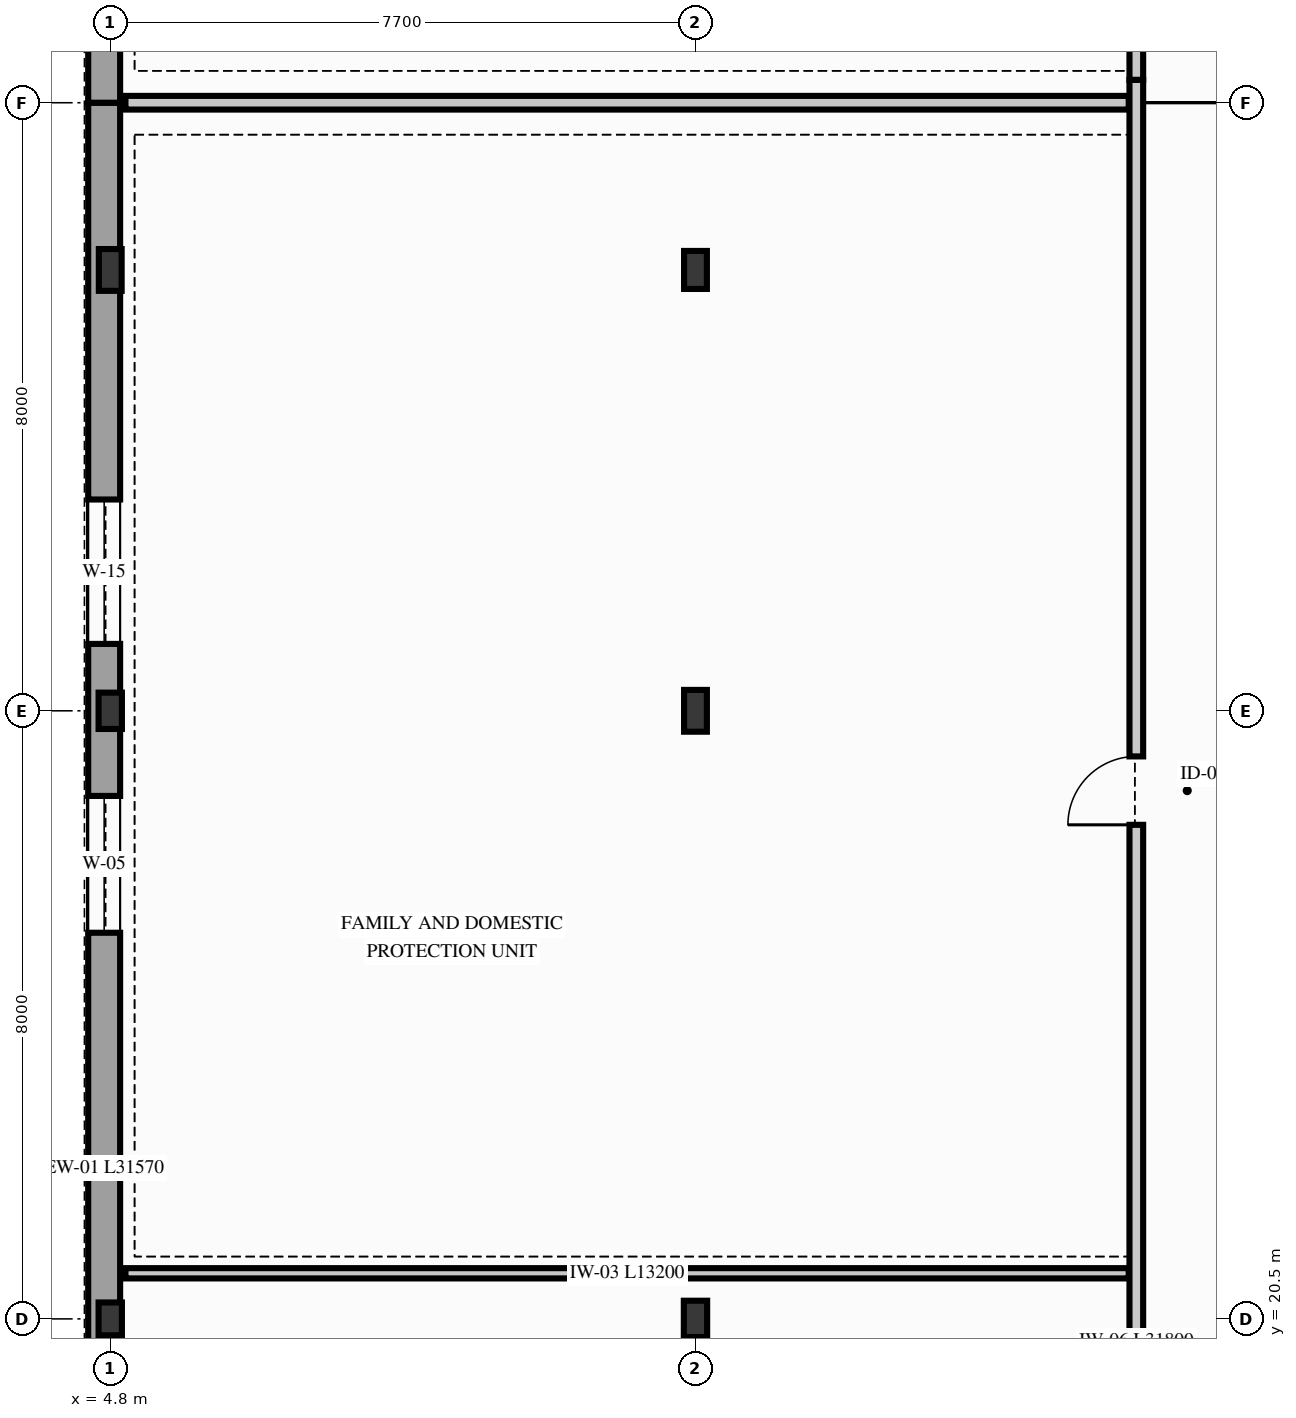
"""IFC4 building model, lengths in metres.
Left out: names, types, materials, properties, quantities, classifications, styles, units other than length and angle.
Written with IfcOpenShell. Run it as: python <this file> out.ifc"""

import sys

from ifc_helpers import new_model, si_unit, direction, frame, frame_2d, origin, origin_2d, place, context, subcontext, project, spatial, rectangle, i_section, extrude, element, fill, save


model = new_model("IFC4")
c1 = context("Model", 3, precision=1e-05, world=origin(), true_north=direction((0.0, 1.0)))
c2 = subcontext(c1, "Body", "Model", "MODEL_VIEW")
j1 = project(units=[si_unit("LENGTHUNIT", "METRE"), si_unit("PLANEANGLEUNIT", "RADIAN")], contexts=[c1])
p1 = place(None, origin())
s1 = spatial("IfcSite", under=j1, at=p1, CompositionType="ELEMENT")
p2 = place(p1, origin())
s2 = spatial("IfcBuilding", under=s1, at=p2, CompositionType="ELEMENT")
p3 = place(p2, frame((0.0, 0.0, 9.3)))
s3 = spatial("IfcBuildingStorey", under=s2, at=p3, CompositionType="ELEMENT", Elevation=9.3)
p4 = place(p3, frame((4.8, 20.5, 0.0), z_axis=(0.0, 0.0, 1.0), x_axis=(1.0, 0.0, 0.0)))
e1 = element("IfcColumn", 1, at=p4, inside=s3, PredefinedType="COLUMN", context=c2, shape_type="SweptSolid", body=[
    extrude(i_section(OverallWidth=0.307, OverallDepth=0.432, WebThickness=0.021, FlangeThickness=0.04, FilletRadius=0.027, at=origin_2d()), origin(), (0.0, 0.0, 1.0), 4.2),
])
p5 = place(p3, frame((4.8, 28.5, 0.0), z_axis=(0.0, 0.0, 1.0), x_axis=(1.0, 0.0, 0.0)))
e2 = element("IfcColumn", 2, at=p5, inside=s3, PredefinedType="COLUMN", context=c2, shape_type="SweptSolid", body=[
    extrude(i_section(OverallWidth=0.307, OverallDepth=0.478, WebThickness=0.021, FlangeThickness=0.04, FilletRadius=0.027, at=origin_2d()), origin(), (0.0, 0.0, 1.0), 4.2),
])
p6 = place(p3, frame((4.8, 34.3, 0.0), z_axis=(0.0, 0.0, 1.0), x_axis=(1.0, 0.0, 0.0)))
e3 = element("IfcColumn", 3, at=p6, inside=s3, PredefinedType="COLUMN", context=c2, shape_type="SweptSolid", body=[
    extrude(i_section(OverallWidth=0.3, OverallDepth=0.55, WebThickness=0.015, FlangeThickness=0.029, FilletRadius=0.027, at=origin_2d()), origin(), (0.0, 0.0, 1.0), 4.2),
])
p7 = place(p3, frame((12.5, 20.5, 0.0), z_axis=(0.0, 0.0, 1.0), x_axis=(1.0, 0.0, 0.0)))
e4 = element("IfcColumn", 4, at=p7, inside=s3, PredefinedType="COLUMN", context=c2, shape_type="SweptSolid", body=[
    extrude(i_section(OverallWidth=0.307, OverallDepth=0.478, WebThickness=0.021, FlangeThickness=0.04, FilletRadius=0.027, at=origin_2d()), origin(), (0.0, 0.0, 1.0), 4.2),
])
p8 = place(p3, frame((12.5, 28.5, 0.0), z_axis=(0.0, 0.0, 1.0), x_axis=(1.0, 0.0, 0.0)))
e5 = element("IfcColumn", 5, at=p8, inside=s3, PredefinedType="COLUMN", context=c2, shape_type="SweptSolid", body=[
    extrude(i_section(OverallWidth=0.3, OverallDepth=0.55, WebThickness=0.015, FlangeThickness=0.029, FilletRadius=0.027, at=origin_2d()), origin(), (0.0, 0.0, 1.0), 4.2),
])
p9 = place(p3, frame((12.5, 34.3, 0.0), z_axis=(0.0, 0.0, 1.0), x_axis=(1.0, 0.0, 0.0)))
e6 = element("IfcColumn", 6, at=p9, inside=s3, PredefinedType="COLUMN", context=c2, shape_type="SweptSolid", body=[
    extrude(i_section(OverallWidth=0.3, OverallDepth=0.5, WebThickness=0.014, FlangeThickness=0.028, FilletRadius=0.027, at=origin_2d()), origin(), (0.0, 0.0, 1.0), 4.2),
])
p10 = place(p3, frame((4.72, 4.93, 0.0), z_axis=(0.0, 0.0, 1.0), x_axis=(0.0, 1.0, 0.0)))
e7 = element("IfcWall", 7, at=p10, inside=s3, PredefinedType="SOLIDWALL", context=c2, shape_type="SweptSolid", body=[
    extrude(rectangle(XDim=31.57, YDim=0.42, at=frame_2d((15.785, 0.0))), origin(), (0.0, 0.0, 1.0), 3.7),
])
p11 = place(p10, frame((1.65, 0.0, 0.85)))
e8 = element("IfcOpeningElement", 8, at=p11, cuts=e7, PredefinedType="OPENING", context=c2, shape_type="SweptSolid", body=[
    extrude(rectangle(XDim=1.3, YDim=2.15, at=frame_2d((0.65, 1.075))), frame((0.0, 0.22, 0.0), z_axis=(0.0, -1.0, 0.0), x_axis=(1.0, 0.0, 0.0)), (0.0, 0.0, 1.0), 0.44),
])
p12 = place(p10, frame((5.45, 0.0, 0.84)))
e9 = element("IfcOpeningElement", 9, at=p12, cuts=e7, PredefinedType="OPENING", context=c2, shape_type="SweptSolid", body=[
    extrude(rectangle(XDim=1.5, YDim=2.3, at=frame_2d((0.75, 1.15))), frame((0.0, 0.22, 0.0), z_axis=(0.0, -1.0, 0.0), x_axis=(1.0, 0.0, 0.0)), (0.0, 0.0, 1.0), 0.44),
])
p13 = place(p10, frame((9.25, 0.0, 0.74)))
e10 = element("IfcOpeningElement", 10, at=p13, cuts=e7, PredefinedType="OPENING", context=c2, shape_type="SweptSolid", body=[
    extrude(rectangle(XDim=1.6, YDim=2.4, at=frame_2d((0.8, 1.2))), frame((0.0, 0.22, 0.0), z_axis=(0.0, -1.0, 0.0), x_axis=(1.0, 0.0, 0.0)), (0.0, 0.0, 1.0), 0.44),
])
p14 = place(p10, frame((13.05, 0.0, 0.85)))
e11 = element("IfcOpeningElement", 11, at=p14, cuts=e7, PredefinedType="OPENING", context=c2, shape_type="SweptSolid", body=[
    extrude(rectangle(XDim=1.4, YDim=2.2, at=frame_2d((0.7, 1.1))), frame((0.0, 0.22, 0.0), z_axis=(0.0, -1.0, 0.0), x_axis=(1.0, 0.0, 0.0)), (0.0, 0.0, 1.0), 0.44),
])
p15 = place(p10, frame((20.65, 0.0, 0.74)))
e12 = element("IfcOpeningElement", 12, at=p15, cuts=e7, PredefinedType="OPENING", context=c2, shape_type="SweptSolid", body=[
    extrude(rectangle(XDim=1.8, YDim=2.4, at=frame_2d((0.9, 1.2))), frame((0.0, 0.22, 0.0), z_axis=(0.0, -1.0, 0.0), x_axis=(1.0, 0.0, 0.0)), (0.0, 0.0, 1.0), 0.44),
])
p16 = place(p10, frame((24.45, 0.0, 0.69)))
e13 = element("IfcOpeningElement", 13, at=p16, cuts=e7, PredefinedType="OPENING", context=c2, shape_type="SweptSolid", body=[
    extrude(rectangle(XDim=1.9, YDim=2.45, at=frame_2d((0.95, 1.225))), frame((0.0, 0.22, 0.0), z_axis=(0.0, -1.0, 0.0), x_axis=(1.0, 0.0, 0.0)), (0.0, 0.0, 1.0), 0.44),
])
p17 = place(p3, frame((4.72, 36.5, 0.0), z_axis=(0.0, 0.0, 1.0), x_axis=(0.0, 1.0, 0.0)))
e14 = element("IfcWall", 14, at=p17, inside=s3, PredefinedType="SOLIDWALL", context=c2, shape_type="SweptSolid", body=[
    extrude(rectangle(XDim=47.0, YDim=0.42, at=frame_2d((23.5, 0.0))), origin(), (0.0, 0.0, 1.0), 3.68),
])
p18 = place(p17, frame((1.65, 0.0, 0.74)))
e15 = element("IfcOpeningElement", 15, at=p18, cuts=e14, PredefinedType="OPENING", context=c2, shape_type="SweptSolid", body=[
    extrude(rectangle(XDim=1.6, YDim=2.4, at=frame_2d((0.8, 1.2))), frame((0.0, 0.22, 0.0), z_axis=(0.0, -1.0, 0.0), x_axis=(1.0, 0.0, 0.0)), (0.0, 0.0, 1.0), 0.44),
])
p19 = place(p17, frame((5.5, 0.0, 0.74)))
e16 = element("IfcOpeningElement", 16, at=p19, cuts=e14, PredefinedType="OPENING", context=c2, shape_type="SweptSolid", body=[
    extrude(rectangle(XDim=1.8, YDim=2.4, at=frame_2d((0.9, 1.2))), frame((0.0, 0.22, 0.0), z_axis=(0.0, -1.0, 0.0), x_axis=(1.0, 0.0, 0.0)), (0.0, 0.0, 1.0), 0.44),
])
p20 = place(p17, frame((9.35, 0.0, 0.84)))
e17 = element("IfcOpeningElement", 17, at=p20, cuts=e14, PredefinedType="OPENING", context=c2, shape_type="SweptSolid", body=[
    extrude(rectangle(XDim=1.5, YDim=2.3, at=frame_2d((0.75, 1.15))), frame((0.0, 0.22, 0.0), z_axis=(0.0, -1.0, 0.0), x_axis=(1.0, 0.0, 0.0)), (0.0, 0.0, 1.0), 0.44),
])
p21 = place(p17, frame((20.9, 0.0, 0.74)))
e18 = element("IfcOpeningElement", 18, at=p21, cuts=e14, PredefinedType="OPENING", context=c2, shape_type="SweptSolid", body=[
    extrude(rectangle(XDim=2.4, YDim=2.4, at=frame_2d((1.2, 1.2))), frame((0.0, 0.22, 0.0), z_axis=(0.0, -1.0, 0.0), x_axis=(1.0, 0.0, 0.0)), (0.0, 0.0, 1.0), 0.44),
])
p22 = place(p17, frame((24.75, 0.0, 0.74)))
e19 = element("IfcOpeningElement", 19, at=p22, cuts=e14, PredefinedType="OPENING", context=c2, shape_type="SweptSolid", body=[
    extrude(rectangle(XDim=1.6, YDim=2.4, at=frame_2d((0.8, 1.2))), frame((0.0, 0.22, 0.0), z_axis=(0.0, -1.0, 0.0), x_axis=(1.0, 0.0, 0.0)), (0.0, 0.0, 1.0), 0.44),
])
p23 = place(p17, frame((40.15, 0.0, 0.54)))
e20 = element("IfcOpeningElement", 20, at=p23, cuts=e14, PredefinedType="OPENING", context=c2, shape_type="SweptSolid", body=[
    extrude(rectangle(XDim=2.2, YDim=2.6, at=frame_2d((1.1, 1.3))), frame((0.0, 0.22, 0.0), z_axis=(0.0, -1.0, 0.0), x_axis=(1.0, 0.0, 0.0)), (0.0, 0.0, 1.0), 0.44),
])
p24 = place(p3, frame((18.3, 36.8, 0.0), z_axis=(0.0, 0.0, 1.0), x_axis=(0.0, 1.0, 0.0)))
e21 = element("IfcWall", 21, at=p24, inside=s3, PredefinedType="PARTITIONING", context=c2, shape_type="SweptSolid", body=[
    extrude(rectangle(XDim=35.95, YDim=0.18, at=frame_2d((17.975, 0.0))), origin(), (0.0, 0.0, 1.0), 3.678),
])
p25 = place(p24, frame((7.0, 0.0, 0.0)))
e22 = element("IfcOpeningElement", 22, at=p25, cuts=e21, PredefinedType="OPENING", context=c2, shape_type="SweptSolid", body=[
    extrude(rectangle(XDim=1.02, YDim=2.18, at=frame_2d((0.51, 1.09))), frame((0.0, 0.1, 0.0), z_axis=(0.0, -1.0, 0.0), x_axis=(1.0, 0.0, 0.0)), (0.0, 0.0, 1.0), 0.2),
])
p26 = place(p24, frame((22.0, 0.0, 0.0)))
e23 = element("IfcOpeningElement", 23, at=p26, cuts=e21, PredefinedType="OPENING", context=c2, shape_type="SweptSolid", body=[
    extrude(rectangle(XDim=1.05, YDim=2.2, at=frame_2d((0.525, 1.1))), frame((0.0, 0.1, 0.0), z_axis=(0.0, -1.0, 0.0), x_axis=(1.0, 0.0, 0.0)), (0.0, 0.0, 1.0), 0.2),
])
p27 = place(p3, frame((18.3, 5.0, 0.0), z_axis=(0.0, 0.0, 1.0), x_axis=(0.0, 1.0, 0.0)))
e24 = element("IfcWall", 24, at=p27, inside=s3, PredefinedType="PARTITIONING", context=c2, shape_type="SweptSolid", body=[
    extrude(rectangle(XDim=31.8, YDim=0.18, at=frame_2d((15.9, 0.0))), origin(), (0.0, 0.0, 1.0), 3.698),
])
p28 = place(p27, frame((7.5, 0.0, 0.0)))
e25 = element("IfcOpeningElement", 25, at=p28, cuts=e24, PredefinedType="OPENING", context=c2, shape_type="SweptSolid", body=[
    extrude(rectangle(XDim=0.92, YDim=2.12, at=frame_2d((0.46, 1.06))), frame((0.0, 0.1, 0.0), z_axis=(0.0, -1.0, 0.0), x_axis=(1.0, 0.0, 0.0)), (0.0, 0.0, 1.0), 0.2),
])
p29 = place(p27, frame((22.0, 0.0, 0.0)))
e26 = element("IfcOpeningElement", 26, at=p29, cuts=e24, PredefinedType="OPENING", context=c2, shape_type="SweptSolid", body=[
    extrude(rectangle(XDim=0.9, YDim=2.1, at=frame_2d((0.45, 1.05))), frame((0.0, 0.1, 0.0), z_axis=(0.0, -1.0, 0.0), x_axis=(1.0, 0.0, 0.0)), (0.0, 0.0, 1.0), 0.2),
])
p30 = place(p3, frame((5.0, 36.5, 0.0), z_axis=(0.0, 0.0, 1.0), x_axis=(1.0, 0.0, 0.0)))
e27 = element("IfcWall", 27, at=p30, inside=s3, PredefinedType="PARTITIONING", context=c2, shape_type="SweptSolid", body=[
    extrude(rectangle(XDim=13.2, YDim=0.18, at=frame_2d((6.6, 0.0))), origin(), (0.0, 0.0, 1.0), 3.92),
])
p31 = place(p3, frame((5.0, 21.1, 0.0), z_axis=(0.0, 0.0, 1.0), x_axis=(1.0, 0.0, 0.0)))
e28 = element("IfcWall", 28, at=p31, inside=s3, PredefinedType="PARTITIONING", context=c2, shape_type="SweptSolid", body=[
    extrude(rectangle(XDim=13.2, YDim=0.135, at=frame_2d((6.6, 0.0))), origin(), (0.0, 0.0, 1.0), 3.598),
])
p32 = place(p15, origin())
e29 = element("IfcWindow", 29, at=p32, inside=s3, PartitioningType="SINGLE_PANEL", PredefinedType="WINDOW", context=c2, shape_type="SweptSolid", body=[
    extrude(rectangle(XDim=1.8, YDim=2.4, at=frame_2d((0.9, 1.2))), frame((0.0, 0.03, 0.0), z_axis=(0.0, -1.0, 0.0), x_axis=(1.0, 0.0, 0.0)), (0.0, 0.0, 1.0), 0.06),
])
fill(e12, e29)
p33 = place(p16, origin())
e30 = element("IfcWindow", 30, at=p33, inside=s3, PartitioningType="SINGLE_PANEL", PredefinedType="WINDOW", context=c2, shape_type="SweptSolid", body=[
    extrude(rectangle(XDim=1.9, YDim=2.45, at=frame_2d((0.95, 1.225))), frame((0.0, 0.03, 0.0), z_axis=(0.0, -1.0, 0.0), x_axis=(1.0, 0.0, 0.0)), (0.0, 0.0, 1.0), 0.06),
])
fill(e13, e30)
p34 = place(p29, origin())
e31 = element("IfcDoor", 31, at=p34, inside=s3, OperationType="SINGLE_SWING_LEFT", PredefinedType="DOOR", context=c2, shape_type="SweptSolid", body=[
    extrude(rectangle(XDim=0.9, YDim=2.1, at=frame_2d((0.45, 1.05))), frame((0.0, 0.025, 0.0), z_axis=(0.0, -1.0, 0.0), x_axis=(1.0, 0.0, 0.0)), (0.0, 0.0, 1.0), 0.05),
])
fill(e26, e31)
save(model, sys.argv[1])
